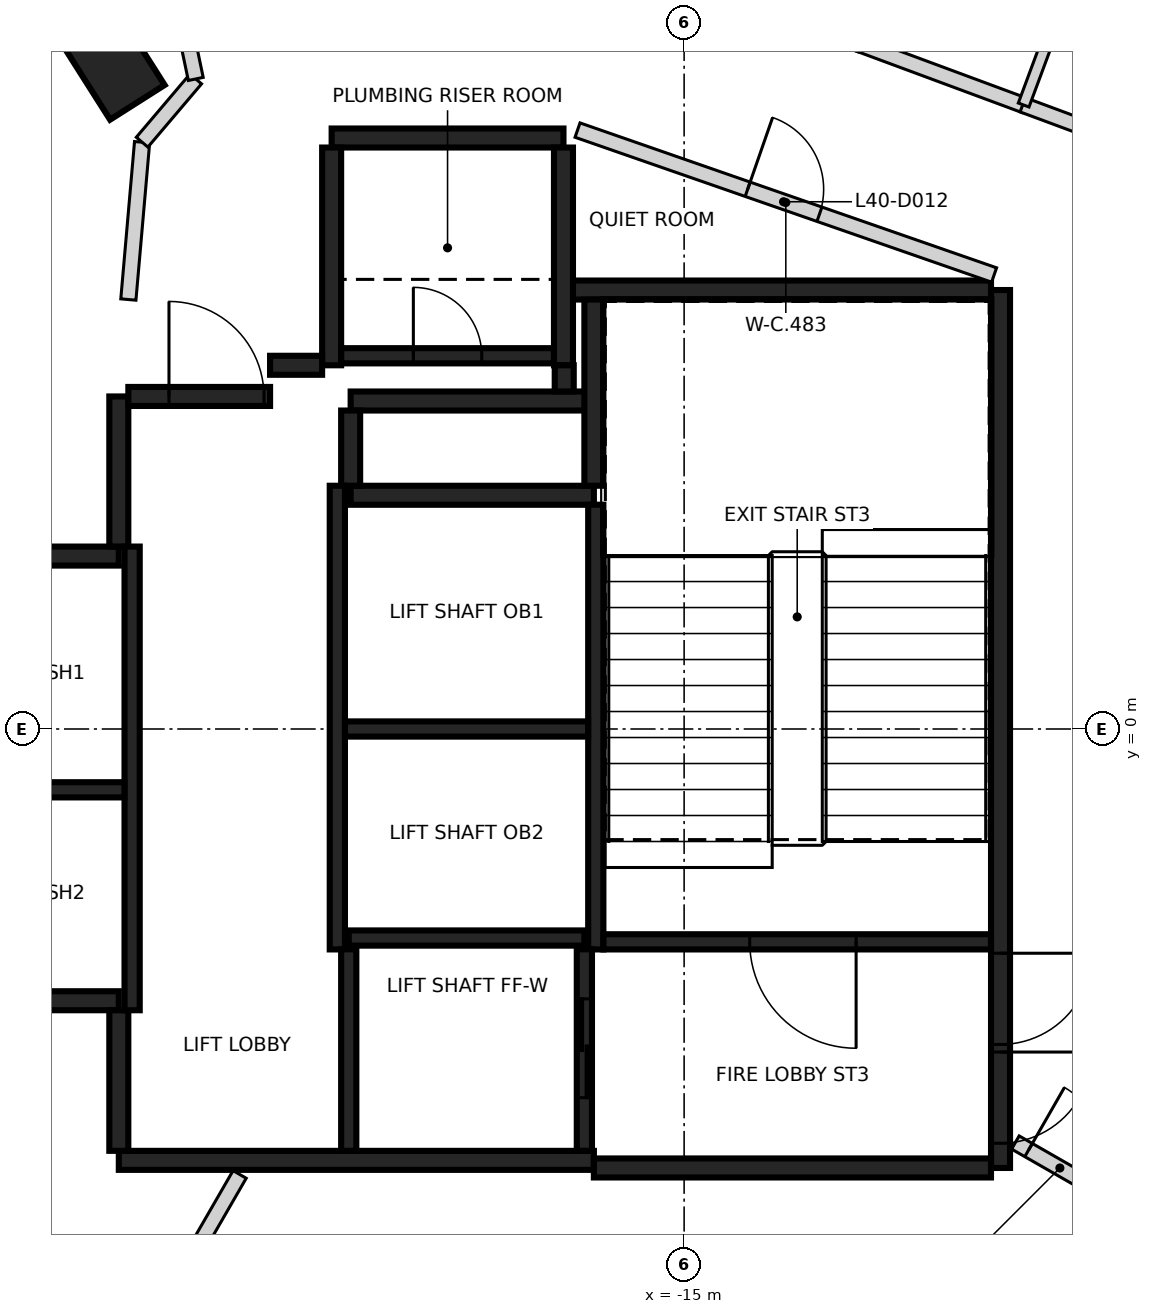
"""IFC4 building model, lengths in metres.
Left out: names, types, materials, properties, quantities, classifications, styles, units other than length and angle.
Written with IfcOpenShell. Run it as: python <this file> out.ifc"""

import sys

from ifc_helpers import new_model, si_unit, direction, frame, frame_2d, origin, origin_2d, place, context, subcontext, project, spatial, rectangle, extrude, element, fill, save


model = new_model("IFC4")
c1 = context("Model", 3, precision=1e-05, world=origin(), true_north=direction((0.0, 1.0)))
c2 = subcontext(c1, "Body", "Model", "MODEL_VIEW")
j1 = project(units=[si_unit("LENGTHUNIT", "METRE"), si_unit("PLANEANGLEUNIT", "RADIAN")], contexts=[c1])
p1 = place(None, origin())
s1 = spatial("IfcSite", under=j1, at=p1, CompositionType="ELEMENT")
p2 = place(p1, origin())
s2 = spatial("IfcBuilding", under=s1, at=p2, CompositionType="ELEMENT")
p3 = place(p2, frame((0.0, 0.0, 161.2)))
s3 = spatial("IfcBuildingStorey", under=s2, at=p3, CompositionType="ELEMENT", Elevation=161.2)
p4 = place(p3, frame((-22.529, 8.772, -0.4), z_axis=(0.0, 0.0, 1.0), x_axis=(-0.536102335288, 0.844152999224, 0.0)))
e1 = element("IfcColumn", 1, at=p4, inside=s3, PredefinedType="COLUMN", context=c2, shape_type="SweptSolid", body=[
    extrude(rectangle(XDim=1.25, YDim=0.85, at=origin_2d()), origin(), (0.0, 0.0, 1.0), 2.884),
])
p5 = place(p3, frame((-10.837, 5.775, 0.0), z_axis=(0.0, 0.0, 1.0), x_axis=(0.0, -1.0, 0.0)))
e2 = element("IfcWall", 2, at=p5, inside=s3, PredefinedType="SHEAR", context=c2, shape_type="SweptSolid", body=[
    extrude(rectangle(XDim=11.55, YDim=0.25, at=frame_2d((5.775, 0.0))), origin(), (0.0, 0.0, 1.0), 3.2),
])
p6 = place(p5, frame((10.025, 0.0, 0.0)))
e3 = element("IfcOpeningElement", 3, at=p6, cuts=e2, PredefinedType="OPENING", context=c2, shape_type="SweptSolid", body=[
    extrude(rectangle(XDim=1.2, YDim=2.1, at=frame_2d((0.6, 1.05))), frame((0.0, 0.135, 0.0), z_axis=(0.0, -1.0, 0.0), x_axis=(1.0, 0.0, 0.0)), (0.0, 0.0, 1.0), 0.27),
])
p7 = place(p5, frame((8.725, 0.0, 0.0)))
e4 = element("IfcOpeningElement", 4, at=p7, cuts=e2, PredefinedType="OPENING", context=c2, shape_type="SweptSolid", body=[
    extrude(rectangle(XDim=1.2, YDim=2.1, at=frame_2d((0.6, 1.05))), frame((0.0, 0.135, 0.0), z_axis=(0.0, -1.0, 0.0), x_axis=(1.0, 0.0, 0.0)), (0.0, 0.0, 1.0), 0.27),
])
p8 = place(p3, frame((-16.187, -5.675, 0.0), z_axis=(0.0, 0.0, 1.0), x_axis=(-1.0, 0.0, 0.0)))
e5 = element("IfcWall", 5, at=p8, inside=s3, PredefinedType="SHEAR", context=c2, shape_type="SweptSolid", body=[
    extrude(rectangle(XDim=6.25, YDim=0.25, at=frame_2d((3.125, 0.0))), origin(), (0.0, 0.0, 1.0), 3.2),
])
p9 = place(p3, frame((-10.963, -5.775, 0.0), z_axis=(0.0, 0.0, 1.0), x_axis=(-1.0, 0.0, 0.0)))
e6 = element("IfcWall", 6, at=p9, inside=s3, PredefinedType="SHEAR", context=c2, shape_type="SweptSolid", body=[
    extrude(rectangle(XDim=5.225, YDim=0.25, at=frame_2d((2.612, 0.0))), origin(), (0.0, 0.0, 1.0), 3.2),
])
p10 = place(p3, frame((-16.472, 5.775, 0.0), z_axis=(0.0, 0.0, 1.0), x_axis=(1.0, 0.0, 0.0)))
e7 = element("IfcWall", 7, at=p10, inside=s3, PredefinedType="SHEAR", context=c2, shape_type="SweptSolid", body=[
    extrude(rectangle(XDim=5.51, YDim=0.25, at=frame_2d((2.755, 0.0))), origin(), (0.0, 0.0, 1.0), 3.2),
])
p11 = place(p3, frame((-19.387, 3.075, 0.0), z_axis=(0.0, 0.0, 1.0), x_axis=(1.0, 0.0, 0.0)))
e8 = element("IfcWall", 8, at=p11, inside=s3, PredefinedType="SHEAR", context=c2, shape_type="SweptSolid", body=[
    extrude(rectangle(XDim=3.2, YDim=0.25, at=frame_2d((1.6, 0.0))), origin(), (0.0, 0.0, 1.0), 3.2),
])
for number, where, z_axis, x_axis in (
    (9, (-22.437, -3.575, 0.0), (0.0, 0.0, 1.0), (-1.0, 0.0, 0.0)),
    (10, (-25.412, 2.275, 0.0), (0.0, 0.0, 1.0), (1.0, 0.0, 0.0)),
):
    element("IfcWall", number, at=place(p3, frame(where, z_axis=z_axis, x_axis=x_axis)), inside=s3, PredefinedType="SHEAR", context=c2, shape_type="SweptSolid", body=[
        extrude(rectangle(XDim=2.975, YDim=0.25, at=frame_2d((1.487, 0.0))), origin(), (0.0, 0.0, 1.0), 3.2),
    ])
p12 = place(p3, frame((-19.637, 7.775, 0.0), z_axis=(0.0, 0.0, 1.0), x_axis=(1.0, 0.0, 0.0)))
e11 = element("IfcWall", 11, at=p12, inside=s3, PredefinedType="SHEAR", context=c2, shape_type="SweptSolid", body=[
    extrude(rectangle(XDim=3.05, YDim=0.25, at=frame_2d((1.525, 0.0))), origin(), (0.0, 0.0, 1.0), 3.2),
])
for number, where, z_axis, x_axis in (
    (12, (-16.587, 7.65, 0.0), (0.0, 0.0, 1.0), (0.0, -1.0, 0.0)),
    (13, (-19.637, 4.785, 0.0), (0.0, 0.0, 1.0), (0.0, 1.0, 0.0)),
):
    element("IfcWall", number, at=place(p3, frame(where, z_axis=z_axis, x_axis=x_axis)), inside=s3, PredefinedType="SHEAR", context=c2, shape_type="SweptSolid", body=[
        extrude(rectangle(XDim=2.865, YDim=0.25, at=frame_2d((1.432, 0.0))), origin(), (0.0, 0.0, 1.0), 3.2),
    ])
p13 = place(p3, frame((-16.302, 4.315, 0.0), z_axis=(0.0, 0.0, 1.0), x_axis=(-1.0, 0.0, 0.0)))
e14 = element("IfcWall", 14, at=p13, inside=s3, PredefinedType="SHEAR", context=c2, shape_type="SweptSolid", body=[
    extrude(rectangle(XDim=3.085, YDim=0.25, at=frame_2d((1.542, 0.0))), origin(), (0.0, 0.0, 1.0), 3.2),
])
p14 = place(p3, frame((-16.187, 3.2, 0.0), z_axis=(0.0, 0.0, 1.0), x_axis=(0.0, 1.0, 0.0)))
e15 = element("IfcWall", 15, at=p14, inside=s3, PredefinedType="SHEAR", context=c2, shape_type="SweptSolid", body=[
    extrude(rectangle(XDim=2.449, YDim=0.25, at=frame_2d((1.225, 0.0))), origin(), (0.0, 0.0, 1.0), 3.2),
])
p15 = place(p3, frame((-22.437, 2.4, 0.0), z_axis=(0.0, 0.0, 1.0), x_axis=(0.0, 1.0, 0.0)))
e16 = element("IfcWall", 16, at=p15, inside=s3, PredefinedType="SHEAR", context=c2, shape_type="SweptSolid", body=[
    extrude(rectangle(XDim=1.975, YDim=0.25, at=frame_2d((0.987, 0.0))), origin(), (0.0, 0.0, 1.0), 3.2),
])
p16 = place(p3, frame((-22.437, -5.55, 0.0), z_axis=(0.0, 0.0, 1.0), x_axis=(0.0, 1.0, 0.0)))
e17 = element("IfcWall", 17, at=p16, inside=s3, PredefinedType="SHEAR", context=c2, shape_type="SweptSolid", body=[
    extrude(rectangle(XDim=1.849, YDim=0.25, at=frame_2d((0.925, 0.0))), origin(), (0.0, 0.0, 1.0), 3.2),
])
p17 = place(p3, frame((-22.312, 4.375, 0.0), z_axis=(0.0, 0.0, 1.0), x_axis=(1.0, 0.0, 0.0)))
e18 = element("IfcWall", 18, at=p17, inside=s3, PredefinedType="SHEAR", context=c2, shape_type="SweptSolid", body=[
    extrude(rectangle(XDim=1.865, YDim=0.25, at=frame_2d((0.932, 0.0))), origin(), (0.0, 0.0, 1.0), 3.2),
])
p18 = place(p17, frame((0.535, 0.0, 0.0)))
e19 = element("IfcOpeningElement", 19, at=p18, cuts=e18, PredefinedType="OPENING", context=c2, shape_type="SweptSolid", body=[
    extrude(rectangle(XDim=1.25, YDim=2.1, at=frame_2d((0.625, 1.05))), frame((0.0, 0.135, 0.0), z_axis=(0.0, -1.0, 0.0), x_axis=(1.0, 0.0, 0.0)), (0.0, 0.0, 1.0), 0.27),
])
p19 = place(p3, frame((-19.387, 4.19, 0.0), z_axis=(0.0, 0.0, 1.0), x_axis=(0.0, -1.0, 0.0)))
e20 = element("IfcWall", 20, at=p19, inside=s3, PredefinedType="SHEAR", context=c2, shape_type="SweptSolid", body=[
    extrude(rectangle(XDim=0.989, YDim=0.25, at=frame_2d((0.495, 0.0))), origin(), (0.0, 0.0, 1.0), 3.2),
])
p20 = place(p3, frame((-20.447, 4.785, 0.0), z_axis=(0.0, 0.0, 1.0), x_axis=(1.0, 0.0, 0.0)))
e21 = element("IfcWall", 21, at=p20, inside=s3, PredefinedType="SHEAR", context=c2, shape_type="SweptSolid", body=[
    extrude(rectangle(XDim=0.685, YDim=0.25, at=frame_2d((0.342, 0.0))), origin(), (0.0, 0.0, 1.0), 3.2),
])
p21 = place(p3, frame((-16.577, 4.785, 0.0), z_axis=(0.0, 0.0, 1.0), x_axis=(0.0, -1.0, 0.0)))
e22 = element("IfcWall", 22, at=p21, inside=s3, PredefinedType="SHEAR", context=c2, shape_type="SweptSolid", body=[
    extrude(rectangle(XDim=0.344, YDim=0.25, at=frame_2d((0.172, 0.0))), origin(), (0.0, 0.0, 1.0), 3.2),
])
p22 = place(p3, frame((-16.162, 2.951, 0.0), z_axis=(0.0, 0.0, 1.0), x_axis=(0.0, -1.0, 0.0)))
e23 = element("IfcWall", 23, at=p22, inside=s3, PredefinedType="SHEAR", context=c2, shape_type="SweptSolid", body=[
    extrude(rectangle(XDim=5.851, YDim=0.2, at=frame_2d((2.925, 0.0))), origin(), (0.0, 0.0, 1.0), 3.2),
])
for number, where, z_axis, x_axis in (
    (24, (-19.562, -2.9, 0.0), (0.0, 0.0, 1.0), (0.0, 1.0, 0.0)),
    (25, (-22.262, 2.4, 0.0), (0.0, 0.0, 1.0), (0.0, -1.0, 0.0)),
):
    element("IfcWall", number, at=place(p3, frame(where, z_axis=z_axis, x_axis=x_axis)), inside=s3, PredefinedType="SHEAR", context=c2, shape_type="SweptSolid", body=[
        extrude(rectangle(XDim=6.1, YDim=0.2, at=frame_2d((3.05, 0.0))), origin(), (0.0, 0.0, 1.0), 3.2),
    ])
p23 = place(p3, frame((-10.963, -2.8, 0.0), z_axis=(0.0, 0.0, 1.0), x_axis=(-1.0, 0.0, 0.0)))
e26 = element("IfcWall", 26, at=p23, inside=s3, PredefinedType="SHEAR", context=c2, shape_type="SweptSolid", body=[
    extrude(rectangle(XDim=5.098, YDim=0.2, at=frame_2d((2.549, 0.0))), origin(), (0.0, 0.0, 1.0), 3.2),
])
p24 = place(p23, frame((1.774, 0.0, 0.0)))
e27 = element("IfcOpeningElement", 27, at=p24, cuts=e26, PredefinedType="OPENING", context=c2, shape_type="SweptSolid", body=[
    extrude(rectangle(XDim=1.4, YDim=2.1, at=frame_2d((0.7, 1.05))), frame((0.0, 0.11, 0.0), z_axis=(0.0, -1.0, 0.0), x_axis=(1.0, 0.0, 0.0)), (0.0, 0.0, 1.0), 0.22),
])
p25 = place(p3, frame((-16.263, 0.0, 0.0), z_axis=(0.0, 0.0, 1.0), x_axis=(-1.0, 0.0, 0.0)))
e28 = element("IfcWall", 28, at=p25, inside=s3, PredefinedType="SHEAR", context=c2, shape_type="SweptSolid", body=[
    extrude(rectangle(XDim=3.198, YDim=0.2, at=frame_2d((1.599, 0.0))), origin(), (0.0, 0.0, 1.0), 3.2),
])
p26 = place(p3, frame((-22.363, -0.8, 0.0), z_axis=(0.0, 0.0, 1.0), x_axis=(-1.0, 0.0, 0.0)))
e29 = element("IfcWall", 29, at=p26, inside=s3, PredefinedType="SHEAR", context=c2, shape_type="SweptSolid", body=[
    extrude(rectangle(XDim=3.048, YDim=0.2, at=frame_2d((1.524, 0.0))), origin(), (0.0, 0.0, 1.0), 3.2),
])
p27 = place(p3, frame((-19.511, 4.91, 0.0), z_axis=(0.0, 0.0, 1.0), x_axis=(1.0, 0.0, 0.0)))
e30 = element("IfcWall", 30, at=p27, inside=s3, PredefinedType="SHEAR", context=c2, shape_type="SweptSolid", body=[
    extrude(rectangle(XDim=2.798, YDim=0.2, at=frame_2d((1.399, 0.0))), origin(), (0.0, 0.0, 1.0), 3.2),
])
p28 = place(p27, frame((0.949, 0.0, 0.0)))
e31 = element("IfcOpeningElement", 31, at=p28, cuts=e30, PredefinedType="OPENING", context=c2, shape_type="SweptSolid", body=[
    extrude(rectangle(XDim=0.9, YDim=2.1, at=frame_2d((0.45, 1.05))), frame((0.0, 0.11, 0.0), z_axis=(0.0, -1.0, 0.0), x_axis=(1.0, 0.0, 0.0)), (0.0, 0.0, 1.0), 0.22),
])
p29 = place(p3, frame((-19.412, -2.75, 0.0), z_axis=(0.0, 0.0, 1.0), x_axis=(1.0, 0.0, 0.0)))
e32 = element("IfcWall", 32, at=p29, inside=s3, PredefinedType="SHEAR", context=c2, shape_type="SweptSolid", body=[
    extrude(rectangle(XDim=3.1, YDim=0.2, at=frame_2d((1.55, 0.0))), origin(), (0.0, 0.0, 1.0), 3.2),
])
p30 = place(p3, frame((-16.312, -2.898, 0.0), z_axis=(0.0, 0.0, 1.0), x_axis=(0.0, -1.0, 0.0)))
e33 = element("IfcWall", 33, at=p30, inside=s3, PredefinedType="SHEAR", context=c2, shape_type="SweptSolid", body=[
    extrude(rectangle(XDim=2.651, YDim=0.2, at=frame_2d((1.325, 0.0))), origin(), (0.0, 0.0, 1.0), 3.2),
])
p31 = place(p30, frame((0.652, 0.0, 0.0)))
e34 = element("IfcOpeningElement", 34, at=p31, cuts=e33, PredefinedType="OPENING", context=c2, shape_type="SweptSolid", body=[
    extrude(rectangle(XDim=1.3, YDim=2.1, at=frame_2d((0.65, 1.05))), frame((0.0, 0.11, 0.0), z_axis=(0.0, -1.0, 0.0), x_axis=(1.0, 0.0, 0.0)), (0.0, 0.0, 1.0), 0.22),
])
p32 = place(p3, frame((-19.412, -5.549, 0.0), z_axis=(0.0, 0.0, 1.0), x_axis=(0.0, 1.0, 0.0)))
e35 = element("IfcWall", 35, at=p32, inside=s3, PredefinedType="SHEAR", context=c2, shape_type="SweptSolid", body=[
    extrude(rectangle(XDim=2.651, YDim=0.2, at=frame_2d((1.325, 0.0))), origin(), (0.0, 0.0, 1.0), 3.2),
])
p33 = place(p3, frame((-22.131, 7.72, 0.0), z_axis=(0.0, 0.0, 1.0), x_axis=(-0.086827346826, -0.996223374471, 0.0)))
e36 = element("IfcWall", 36, at=p33, inside=s3, PredefinedType="PARTITIONING", context=c2, shape_type="SweptSolid", body=[
    extrude(rectangle(XDim=2.078, YDim=0.2, at=frame_2d((1.039, 0.0))), origin(), (0.0, 0.0, 1.0), 3.2),
])
p34 = place(p3, frame((-22.131, 7.72, 0.0), z_axis=(0.0, 0.0, 1.0), x_axis=(0.647024749006, 0.762468998828, 0.0)))
e37 = element("IfcWall", 37, at=p34, inside=s3, PredefinedType="PARTITIONING", context=c2, shape_type="SweptSolid", body=[
    extrude(rectangle(XDim=1.091, YDim=0.2, at=frame_2d((0.546, 0.0))), origin(), (0.0, 0.0, 1.0), 3.2),
])
p35 = place(p3, frame((-21.605, 9.412, 0.0), z_axis=(0.0, 0.0, 1.0), x_axis=(0.204764111512, -0.978811349871, 0.0)))
e38 = element("IfcWall", 38, at=p35, inside=s3, PredefinedType="PARTITIONING", context=c2, shape_type="SweptSolid", body=[
    extrude(rectangle(XDim=0.879, YDim=0.2, at=frame_2d((0.439, 0.0))), origin(), (0.0, 0.0, 1.0), 3.2),
])
p36 = place(p3, frame((-16.402, 7.879, 0.0), z_axis=(0.0, 0.0, 1.0), x_axis=(0.944492255471, -0.328533680702, 0.0)))
e39 = element("IfcWall", 39, at=p36, inside=s3, PredefinedType="PARTITIONING", context=c2, shape_type="SweptSolid", body=[
    extrude(rectangle(XDim=5.802, YDim=0.2, at=frame_2d((2.901, 0.0))), origin(), (0.0, 0.0, 1.0), 3.2),
])
p37 = place(p36, frame((2.37, 0.0, 0.0)))
e40 = element("IfcOpeningElement", 40, at=p37, cuts=e39, PredefinedType="OPENING", context=c2, shape_type="SweptSolid", body=[
    extrude(rectangle(XDim=1.0, YDim=2.1, at=frame_2d((0.5, 1.05))), frame((0.0, 0.11, 0.0), z_axis=(0.0, -1.0, 0.0), x_axis=(1.0, 0.0, 0.0)), (0.0, 0.0, 1.0), 0.22),
])
p38 = place(p3, frame((-12.699, 9.011, 0.0), z_axis=(0.0, 0.0, 1.0), x_axis=(0.937666284737, -0.347536959858, 0.0)))
e41 = element("IfcWall", 41, at=p38, inside=s3, PredefinedType="PARTITIONING", context=c2, shape_type="SweptSolid", body=[
    extrude(rectangle(XDim=2.322, YDim=0.2, at=frame_2d((1.161, 0.0))), origin(), (0.0, 0.0, 1.0), 3.2),
])
p39 = place(p3, frame((-10.642, -5.44, 0.0), z_axis=(0.0, 0.0, 1.0), x_axis=(0.867610688994, -0.497244097344, 0.0)))
e42 = element("IfcWall", 42, at=p39, inside=s3, PredefinedType="PARTITIONING", context=c2, shape_type="SweptSolid", body=[
    extrude(rectangle(XDim=10.464, YDim=0.2, at=frame_2d((5.232, 0.0))), origin(), (0.0, 0.0, 1.0), 3.2),
])
p40 = place(p39, frame((0.2, 0.0, 0.0)))
e43 = element("IfcOpeningElement", 43, at=p40, cuts=e42, PredefinedType="OPENING", context=c2, shape_type="SweptSolid", body=[
    extrude(rectangle(XDim=0.95, YDim=2.1, at=frame_2d((0.475, 1.05))), frame((0.0, 0.11, 0.0), z_axis=(0.0, -1.0, 0.0), x_axis=(1.0, 0.0, 0.0)), (0.0, 0.0, 1.0), 0.22),
])
p41 = place(p39, frame((7.519, 0.0, 0.0)))
e44 = element("IfcOpeningElement", 44, at=p41, cuts=e42, PredefinedType="OPENING", context=c2, shape_type="SweptSolid", body=[
    extrude(rectangle(XDim=0.95, YDim=2.1, at=frame_2d((0.475, 1.05))), frame((0.0, 0.11, 0.0), z_axis=(0.0, -1.0, 0.0), x_axis=(1.0, 0.0, 0.0)), (0.0, 0.0, 1.0), 0.22),
])
p42 = place(p39, frame((8.846, 0.0, 0.0)))
e45 = element("IfcOpeningElement", 45, at=p42, cuts=e42, PredefinedType="OPENING", context=c2, shape_type="SweptSolid", body=[
    extrude(rectangle(XDim=0.95, YDim=2.1, at=frame_2d((0.475, 1.05))), frame((0.0, 0.11, 0.0), z_axis=(0.0, -1.0, 0.0), x_axis=(1.0, 0.0, 0.0)), (0.0, 0.0, 1.0), 0.22),
])
p43 = place(p3, frame((-10.545, 8.212, 0.0), z_axis=(0.0, 0.0, 1.0), x_axis=(0.937637162141, -0.347615523491, 0.0)))
e46 = element("IfcWall", 46, at=p43, inside=s3, PredefinedType="PARTITIONING", context=c2, shape_type="SweptSolid", body=[
    extrude(rectangle(XDim=1.61, YDim=0.2, at=frame_2d((0.805, 0.0))), origin(), (0.0, 0.0, 1.0), 3.2),
])
p44 = place(p3, frame((-23.351, -10.197, 0.0), z_axis=(0.0, 0.0, 1.0), x_axis=(0.499872996861, 0.866098716665, 0.0)))
e47 = element("IfcWall", 47, at=p44, inside=s3, PredefinedType="PARTITIONING", context=c2, shape_type="SweptSolid", body=[
    extrude(rectangle(XDim=5.007, YDim=0.2, at=frame_2d((2.503, 0.0))), origin(), (0.0, 0.0, 1.0), 3.2),
])
p45 = place(p3, frame((-12.279, 16.946, 0.0), z_axis=(0.0, 0.0, 1.0), x_axis=(0.500003997498, -0.866023095816, 0.0)))
e48 = element("IfcWall", 48, at=p45, inside=s3, PredefinedType="PARTITIONING", context=c2, shape_type="SweptSolid", body=[
    extrude(rectangle(XDim=10.809, YDim=0.2, at=frame_2d((5.405, 0.0))), origin(), (0.0, 0.0, 1.0), 3.2),
])
p46 = place(p3, frame((-10.533, 8.209, 0.0), z_axis=(0.0, 0.0, 1.0), x_axis=(0.348035300423, 0.937481428968, 0.0)))
e49 = element("IfcWall", 49, at=p46, inside=s3, PredefinedType="PARTITIONING", context=c2, shape_type="SweptSolid", body=[
    extrude(rectangle(XDim=3.0, YDim=0.15, at=frame_2d((1.5, 0.0))), origin(), (0.0, 0.0, 1.0), 3.2),
])
p47 = place(p46, frame((1.1, 0.0, 0.0)))
e50 = element("IfcOpeningElement", 50, at=p47, cuts=e49, PredefinedType="OPENING", context=c2, shape_type="SweptSolid", body=[
    extrude(rectangle(XDim=0.8, YDim=2.1, at=frame_2d((0.4, 1.05))), frame((0.0, 0.085, 0.0), z_axis=(0.0, -1.0, 0.0), x_axis=(1.0, 0.0, 0.0)), (0.0, 0.0, 1.0), 0.17),
])
p48 = place(p3, frame((-10.454, -9.003, 0.0), z_axis=(0.0, 0.0, 1.0), x_axis=(0.49740127306, 0.867520589703, 0.0)))
e51 = element("IfcWall", 51, at=p48, inside=s3, PredefinedType="PARTITIONING", context=c2, shape_type="SweptSolid", body=[
    extrude(rectangle(XDim=2.998, YDim=0.15, at=frame_2d((1.499, 0.0))), origin(), (0.0, 0.0, 1.0), 3.2),
])
p49 = place(p48, frame((1.098, 0.0, 0.0)))
e52 = element("IfcOpeningElement", 52, at=p49, cuts=e51, PredefinedType="OPENING", context=c2, shape_type="SweptSolid", body=[
    extrude(rectangle(XDim=0.8, YDim=2.1, at=frame_2d((0.4, 1.05))), frame((0.0, 0.085, 0.0), z_axis=(0.0, -1.0, 0.0), x_axis=(1.0, 0.0, 0.0)), (0.0, 0.0, 1.0), 0.17),
])
p50 = place(p31, origin())
e53 = element("IfcDoor", 53, at=p50, inside=s3, OperationType="SLIDING_TO_LEFT", PredefinedType="DOOR", context=c2, shape_type="SweptSolid", body=[
    extrude(rectangle(XDim=1.3, YDim=2.1, at=frame_2d((0.65, 1.05))), frame((0.0, 0.025, 0.0), z_axis=(0.0, -1.0, 0.0), x_axis=(1.0, 0.0, 0.0)), (0.0, 0.0, 1.0), 0.05),
])
fill(e34, e53)
p51 = place(p18, origin())
e54 = element("IfcDoor", 54, at=p51, inside=s3, OperationType="SINGLE_SWING_LEFT", PredefinedType="DOOR", context=c2, shape_type="SweptSolid", body=[
    extrude(rectangle(XDim=1.25, YDim=2.1, at=frame_2d((0.625, 1.05))), frame((0.0, 0.025, 0.0), z_axis=(0.0, -1.0, 0.0), x_axis=(1.0, 0.0, 0.0)), (0.0, 0.0, 1.0), 0.05),
])
fill(e19, e54)
p52 = place(p6, origin())
e55 = element("IfcDoor", 55, at=p52, inside=s3, OperationType="SINGLE_SWING_LEFT", PredefinedType="DOOR", context=c2, shape_type="SweptSolid", body=[
    extrude(rectangle(XDim=1.2, YDim=2.1, at=frame_2d((0.6, 1.05))), frame((0.0, 0.025, 0.0), z_axis=(0.0, -1.0, 0.0), x_axis=(1.0, 0.0, 0.0)), (0.0, 0.0, 1.0), 0.05),
])
fill(e3, e55)
p53 = place(p7, origin())
e56 = element("IfcDoor", 56, at=p53, inside=s3, OperationType="SINGLE_SWING_RIGHT", PredefinedType="DOOR", context=c2, shape_type="SweptSolid", body=[
    extrude(rectangle(XDim=1.2, YDim=2.1, at=frame_2d((0.6, 1.05))), frame((0.0, 0.025, 0.0), z_axis=(0.0, -1.0, 0.0), x_axis=(1.0, 0.0, 0.0)), (0.0, 0.0, 1.0), 0.05),
])
fill(e4, e56)
p54 = place(p24, origin())
e57 = element("IfcDoor", 57, at=p54, inside=s3, OperationType="SINGLE_SWING_LEFT", PredefinedType="DOOR", context=c2, shape_type="SweptSolid", body=[
    extrude(rectangle(XDim=1.4, YDim=2.1, at=frame_2d((0.7, 1.05))), frame((0.0, 0.025, 0.0), z_axis=(0.0, -1.0, 0.0), x_axis=(1.0, 0.0, 0.0)), (0.0, 0.0, 1.0), 0.05),
])
fill(e27, e57)
p55 = place(p28, origin())
e58 = element("IfcDoor", 58, at=p55, inside=s3, OperationType="SINGLE_SWING_RIGHT", PredefinedType="DOOR", context=c2, shape_type="SweptSolid", body=[
    extrude(rectangle(XDim=0.9, YDim=2.1, at=frame_2d((0.45, 1.05))), frame((0.0, 0.025, 0.0), z_axis=(0.0, -1.0, 0.0), x_axis=(1.0, 0.0, 0.0)), (0.0, 0.0, 1.0), 0.05),
])
fill(e31, e58)
p56 = place(p37, frame((1.0, 0.0, 0.0), z_axis=(0.0, 0.0, 1.0), x_axis=(-1.0, 0.0, 0.0)))
e59 = element("IfcDoor", 59, at=p56, inside=s3, OperationType="SINGLE_SWING_LEFT", PredefinedType="DOOR", context=c2, shape_type="SweptSolid", body=[
    extrude(rectangle(XDim=1.0, YDim=2.1, at=frame_2d((0.5, 1.05))), frame((0.0, 0.025, 0.0), z_axis=(0.0, -1.0, 0.0), x_axis=(1.0, 0.0, 0.0)), (0.0, 0.0, 1.0), 0.05),
])
fill(e40, e59)
p57 = place(p40, frame((0.95, 0.0, 0.0), z_axis=(0.0, 0.0, 1.0), x_axis=(-1.0, 0.0, 0.0)))
e60 = element("IfcDoor", 60, at=p57, inside=s3, OperationType="SINGLE_SWING_LEFT", PredefinedType="DOOR", context=c2, shape_type="SweptSolid", body=[
    extrude(rectangle(XDim=0.95, YDim=2.1, at=frame_2d((0.475, 1.05))), frame((0.0, 0.025, 0.0), z_axis=(0.0, -1.0, 0.0), x_axis=(1.0, 0.0, 0.0)), (0.0, 0.0, 1.0), 0.05),
])
fill(e43, e60)
save(model, sys.argv[1])
